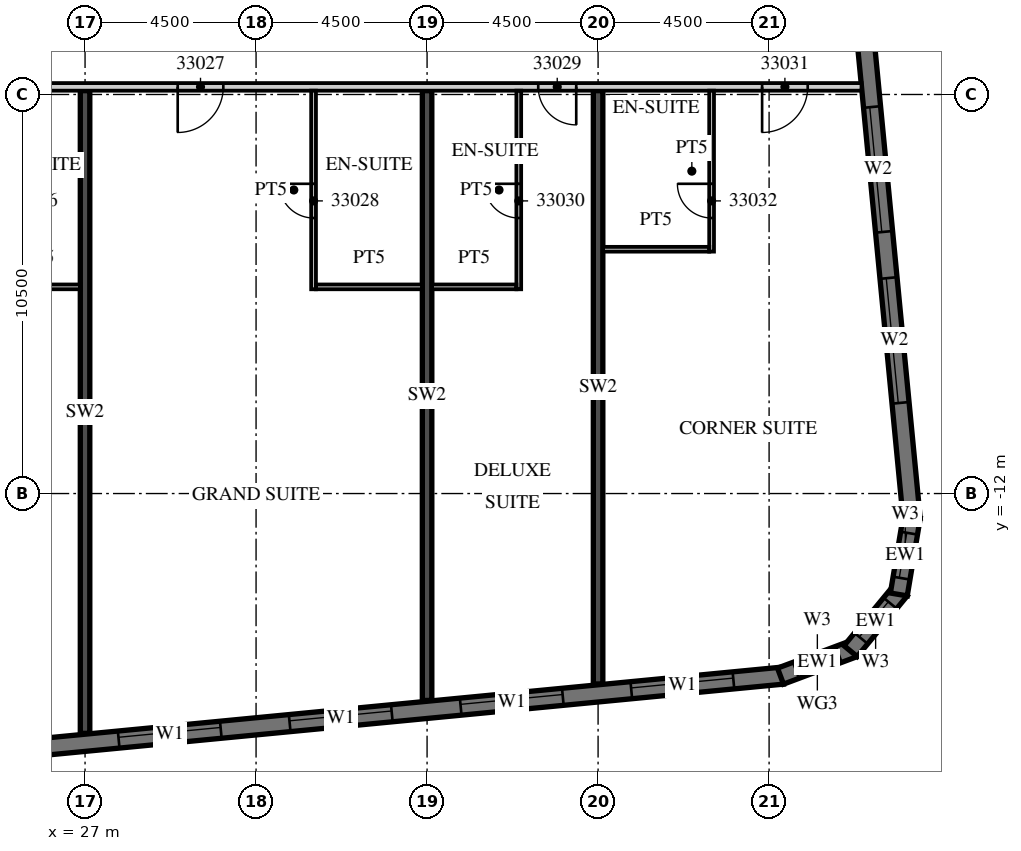
"""IFC4 building model, lengths in metres.
Left out: names, types, materials, properties, quantities, classifications, styles, units other than length and angle.
Written with IfcOpenShell. Run it as: python <this file> out.ifc"""

import sys

from ifc_helpers import new_model, si_unit, direction, frame, frame_2d, origin, place, context, subcontext, project, spatial, polyline, rectangle, outline, extrude, element, fill, save


model = new_model("IFC4")
c1 = context("Model", 3, precision=1e-05, world=origin(), true_north=direction((0.0, 1.0)))
c2 = subcontext(c1, "Body", "Model", "MODEL_VIEW")
j1 = project(units=[si_unit("LENGTHUNIT", "METRE"), si_unit("PLANEANGLEUNIT", "RADIAN")], contexts=[c1])
p1 = place(None, origin())
s1 = spatial("IfcSite", under=j1, at=p1, CompositionType="ELEMENT")
p2 = place(p1, origin())
s2 = spatial("IfcBuilding", under=s1, at=p2, CompositionType="ELEMENT")
p3 = place(p2, frame((0.0, 0.0, 143.8)))
s3 = spatial("IfcBuildingStorey", under=s2, at=p3, CompositionType="ELEMENT", Elevation=143.8)
p4 = place(p3, frame((27.0, -18.311, 0.0), z_axis=(0.0, 0.0, 1.0), x_axis=(0.0, 1.0, 0.0)))
e1 = element("IfcWall", 1, at=p4, inside=s3, PredefinedType="SHEAR", context=c2, shape_type="SweptSolid", body=[
    extrude(rectangle(XDim=16.911, YDim=0.25, at=frame_2d((8.455, 0.0))), origin(), (0.0, 0.0, 1.0), 3.3),
])
p5 = place(p3, frame((36.0, -17.444, 0.0), z_axis=(0.0, 0.0, 1.0), x_axis=(0.0, 1.0, 0.0)))
e2 = element("IfcWall", 2, at=p5, inside=s3, PredefinedType="SHEAR", context=c2, shape_type="SweptSolid", body=[
    extrude(rectangle(XDim=16.044, YDim=0.25, at=frame_2d((8.022, 0.0))), origin(), (0.0, 0.0, 1.0), 3.3),
])
p6 = place(p3, frame((40.5, -17.011, 0.0), z_axis=(0.0, 0.0, 1.0), x_axis=(0.0, 1.0, 0.0)))
e3 = element("IfcWall", 3, at=p6, inside=s3, PredefinedType="SHEAR", context=c2, shape_type="SweptSolid", body=[
    extrude(rectangle(XDim=15.611, YDim=0.25, at=frame_2d((7.805, 0.0))), origin(), (0.0, 0.0, 1.0), 3.3),
])
p7 = place(p3, frame((-13.521, -22.46, 0.0), z_axis=(0.0, 0.0, 1.0), x_axis=(0.995396096335, 0.095846812164, 0.0)))
e4 = element("IfcWall", 4, at=p7, inside=s3, PredefinedType="SOLIDWALL", context=c2, shape_type="SweptSolid", body=[
    extrude(rectangle(XDim=59.151, YDim=0.45, at=frame_2d((29.575, 0.0))), origin(), (0.0, 0.0, 1.0), 3.02),
])
p8 = place(p7, frame((0.91, 0.0, 0.45)))
e5 = element("IfcOpeningElement", 5, at=p8, cuts=e4, PredefinedType="OPENING", context=c2, shape_type="SweptSolid", body=[
    extrude(rectangle(XDim=2.7, YDim=2.25, at=frame_2d((1.35, 1.125))), frame((0.0, 0.235, 0.0), z_axis=(0.0, -1.0, 0.0), x_axis=(1.0, 0.0, 0.0)), (0.0, 0.0, 1.0), 0.47),
])
p9 = place(p7, frame((5.431, 0.0, 0.45)))
e6 = element("IfcOpeningElement", 6, at=p9, cuts=e4, PredefinedType="OPENING", context=c2, shape_type="SweptSolid", body=[
    extrude(rectangle(XDim=2.7, YDim=2.25, at=frame_2d((1.35, 1.125))), frame((0.0, 0.235, 0.0), z_axis=(0.0, -1.0, 0.0), x_axis=(1.0, 0.0, 0.0)), (0.0, 0.0, 1.0), 0.47),
])
p10 = place(p7, frame((9.952, 0.0, 0.45)))
e7 = element("IfcOpeningElement", 7, at=p10, cuts=e4, PredefinedType="OPENING", context=c2, shape_type="SweptSolid", body=[
    extrude(rectangle(XDim=2.7, YDim=2.25, at=frame_2d((1.35, 1.125))), frame((0.0, 0.235, 0.0), z_axis=(0.0, -1.0, 0.0), x_axis=(1.0, 0.0, 0.0)), (0.0, 0.0, 1.0), 0.47),
])
p11 = place(p7, frame((14.473, 0.0, 0.45)))
e8 = element("IfcOpeningElement", 8, at=p11, cuts=e4, PredefinedType="OPENING", context=c2, shape_type="SweptSolid", body=[
    extrude(rectangle(XDim=2.7, YDim=2.25, at=frame_2d((1.35, 1.125))), frame((0.0, 0.235, 0.0), z_axis=(0.0, -1.0, 0.0), x_axis=(1.0, 0.0, 0.0)), (0.0, 0.0, 1.0), 0.47),
])
p12 = place(p7, frame((18.994, 0.0, 0.45)))
e9 = element("IfcOpeningElement", 9, at=p12, cuts=e4, PredefinedType="OPENING", context=c2, shape_type="SweptSolid", body=[
    extrude(rectangle(XDim=2.7, YDim=2.25, at=frame_2d((1.35, 1.125))), frame((0.0, 0.235, 0.0), z_axis=(0.0, -1.0, 0.0), x_axis=(1.0, 0.0, 0.0)), (0.0, 0.0, 1.0), 0.47),
])
p13 = place(p7, frame((23.514, 0.0, 0.45)))
e10 = element("IfcOpeningElement", 10, at=p13, cuts=e4, PredefinedType="OPENING", context=c2, shape_type="SweptSolid", body=[
    extrude(rectangle(XDim=2.7, YDim=2.25, at=frame_2d((1.35, 1.125))), frame((0.0, 0.235, 0.0), z_axis=(0.0, -1.0, 0.0), x_axis=(1.0, 0.0, 0.0)), (0.0, 0.0, 1.0), 0.47),
])
p14 = place(p7, frame((28.035, 0.0, 0.45)))
e11 = element("IfcOpeningElement", 11, at=p14, cuts=e4, PredefinedType="OPENING", context=c2, shape_type="SweptSolid", body=[
    extrude(rectangle(XDim=2.7, YDim=2.25, at=frame_2d((1.35, 1.125))), frame((0.0, 0.235, 0.0), z_axis=(0.0, -1.0, 0.0), x_axis=(1.0, 0.0, 0.0)), (0.0, 0.0, 1.0), 0.47),
])
p15 = place(p7, frame((32.556, 0.0, 0.45)))
e12 = element("IfcOpeningElement", 12, at=p15, cuts=e4, PredefinedType="OPENING", context=c2, shape_type="SweptSolid", body=[
    extrude(rectangle(XDim=2.7, YDim=2.25, at=frame_2d((1.35, 1.125))), frame((0.0, 0.235, 0.0), z_axis=(0.0, -1.0, 0.0), x_axis=(1.0, 0.0, 0.0)), (0.0, 0.0, 1.0), 0.47),
])
p16 = place(p7, frame((37.077, 0.0, 0.45)))
e13 = element("IfcOpeningElement", 13, at=p16, cuts=e4, PredefinedType="OPENING", context=c2, shape_type="SweptSolid", body=[
    extrude(rectangle(XDim=2.7, YDim=2.25, at=frame_2d((1.35, 1.125))), frame((0.0, 0.235, 0.0), z_axis=(0.0, -1.0, 0.0), x_axis=(1.0, 0.0, 0.0)), (0.0, 0.0, 1.0), 0.47),
])
p17 = place(p7, frame((41.598, 0.0, 0.45)))
e14 = element("IfcOpeningElement", 14, at=p17, cuts=e4, PredefinedType="OPENING", context=c2, shape_type="SweptSolid", body=[
    extrude(rectangle(XDim=2.7, YDim=2.25, at=frame_2d((1.35, 1.125))), frame((0.0, 0.235, 0.0), z_axis=(0.0, -1.0, 0.0), x_axis=(1.0, 0.0, 0.0)), (0.0, 0.0, 1.0), 0.47),
])
p18 = place(p7, frame((46.118, 0.0, 0.45)))
e15 = element("IfcOpeningElement", 15, at=p18, cuts=e4, PredefinedType="OPENING", context=c2, shape_type="SweptSolid", body=[
    extrude(rectangle(XDim=2.7, YDim=2.25, at=frame_2d((1.35, 1.125))), frame((0.0, 0.235, 0.0), z_axis=(0.0, -1.0, 0.0), x_axis=(1.0, 0.0, 0.0)), (0.0, 0.0, 1.0), 0.47),
])
p19 = place(p7, frame((50.639, 0.0, 0.45)))
e16 = element("IfcOpeningElement", 16, at=p19, cuts=e4, PredefinedType="OPENING", context=c2, shape_type="SweptSolid", body=[
    extrude(rectangle(XDim=2.7, YDim=2.25, at=frame_2d((1.35, 1.125))), frame((0.0, 0.235, 0.0), z_axis=(0.0, -1.0, 0.0), x_axis=(1.0, 0.0, 0.0)), (0.0, 0.0, 1.0), 0.47),
])
p20 = place(p7, frame((55.15, 0.0, 0.45)))
e17 = element("IfcOpeningElement", 17, at=p20, cuts=e4, PredefinedType="OPENING", context=c2, shape_type="SweptSolid", body=[
    extrude(rectangle(XDim=2.7, YDim=2.25, at=frame_2d((1.35, 1.125))), frame((0.0, 0.235, 0.0), z_axis=(0.0, -1.0, 0.0), x_axis=(1.0, 0.0, 0.0)), (0.0, 0.0, 1.0), 0.47),
])
p21 = place(p3, frame((45.3, -16.804, 0.0), z_axis=(0.0, 0.0, 1.0), x_axis=(0.936677599948, 0.350192909346, 0.0)))
e18 = element("IfcWall", 18, at=p21, inside=s3, PredefinedType="SOLIDWALL", context=c2, shape_type="SweptSolid", body=[
    extrude(outline(polyline([(0.0, -0.225), (2.071, -0.225), (1.95, 0.225), (0.121, 0.225), (0.0, -0.225)])), origin(), (0.0, 0.0, 1.0), 3.02),
])
p22 = place(p21, frame((0.435, 0.0, 0.45)))
e19 = element("IfcOpeningElement", 19, at=p22, cuts=e18, PredefinedType="OPENING", context=c2, shape_type="SweptSolid", body=[
    extrude(rectangle(XDim=1.2, YDim=2.25, at=frame_2d((0.6, 1.125))), frame((0.0, 0.235, 0.0), z_axis=(0.0, -1.0, 0.0), x_axis=(1.0, 0.0, 0.0)), (0.0, 0.0, 1.0), 0.47),
])
p23 = place(p3, frame((47.145, -16.147, 0.0), z_axis=(0.0, 0.0, 1.0), x_axis=(0.635988241739, 0.771698747161, 0.0)))
e20 = element("IfcWall", 20, at=p23, inside=s3, PredefinedType="SOLIDWALL", context=c2, shape_type="SweptSolid", body=[
    extrude(outline(polyline([(0.0, -0.225), (2.071, -0.225), (1.95, 0.225), (0.121, 0.225), (0.0, -0.225)])), origin(), (0.0, 0.0, 1.0), 3.02),
])
p24 = place(p23, frame((0.435, 0.0, 0.45)))
e21 = element("IfcOpeningElement", 21, at=p24, cuts=e20, PredefinedType="OPENING", context=c2, shape_type="SweptSolid", body=[
    extrude(rectangle(XDim=1.2, YDim=2.25, at=frame_2d((0.6, 1.125))), frame((0.0, 0.235, 0.0), z_axis=(0.0, -1.0, 0.0), x_axis=(1.0, 0.0, 0.0)), (0.0, 0.0, 1.0), 0.47),
])
p25 = place(p3, frame((48.413, -14.655, 0.0), z_axis=(0.0, 0.0, 1.0), x_axis=(0.165068144653, 0.986282164302, 0.0)))
e22 = element("IfcWall", 22, at=p25, inside=s3, PredefinedType="SOLIDWALL", context=c2, shape_type="SweptSolid", body=[
    extrude(outline(polyline([(0.0, -0.225), (2.071, -0.225), (1.95, 0.225), (0.121, 0.225), (0.0, -0.225)])), origin(), (0.0, 0.0, 1.0), 3.02),
])
p26 = place(p25, frame((0.435, 0.0, 0.45)))
e23 = element("IfcOpeningElement", 23, at=p26, cuts=e22, PredefinedType="OPENING", context=c2, shape_type="SweptSolid", body=[
    extrude(rectangle(XDim=1.2, YDim=2.25, at=frame_2d((0.6, 1.125))), frame((0.0, 0.235, 0.0), z_axis=(0.0, -1.0, 0.0), x_axis=(1.0, 0.0, 0.0)), (0.0, 0.0, 1.0), 0.47),
])
p27 = place(p3, frame((48.753, -12.672, 0.0), z_axis=(0.0, 0.0, 1.0), x_axis=(-0.095842661909, 0.995396495954, 0.0)))
e24 = element("IfcWall", 24, at=p27, inside=s3, PredefinedType="SOLIDWALL", context=c2, shape_type="SweptSolid", body=[
    extrude(rectangle(XDim=35.0, YDim=0.45, at=frame_2d((17.5, 0.0))), origin(), (0.0, 0.0, 1.0), 3.02),
])
p28 = place(p27, frame((3.072, 0.0, 0.45)))
e25 = element("IfcOpeningElement", 25, at=p28, cuts=e24, PredefinedType="OPENING", context=c2, shape_type="SweptSolid", body=[
    extrude(rectangle(XDim=3.3, YDim=2.25, at=frame_2d((1.65, 1.125))), frame((0.0, 0.235, 0.0), z_axis=(0.0, -1.0, 0.0), x_axis=(1.0, 0.0, 0.0)), (0.0, 0.0, 1.0), 0.47),
])
p29 = place(p27, frame((7.593, 0.0, 0.45)))
e26 = element("IfcOpeningElement", 26, at=p29, cuts=e24, PredefinedType="OPENING", context=c2, shape_type="SweptSolid", body=[
    extrude(rectangle(XDim=3.3, YDim=2.25, at=frame_2d((1.65, 1.125))), frame((0.0, 0.235, 0.0), z_axis=(0.0, -1.0, 0.0), x_axis=(1.0, 0.0, 0.0)), (0.0, 0.0, 1.0), 0.47),
])
p30 = place(p3, frame((-13.5, -1.3, 0.0), z_axis=(0.0, 0.0, 1.0), x_axis=(1.0, 0.0, 0.0)))
e27 = element("IfcWall", 27, at=p30, inside=s3, PredefinedType="PARTITIONING", context=c2, shape_type="SweptSolid", body=[
    extrude(rectangle(XDim=60.932, YDim=0.2, at=frame_2d((30.466, 0.0))), origin(), (0.0, 0.0, 1.0), 3.02),
])
p31 = place(p30, frame((2.925, 0.0, 0.0)))
e28 = element("IfcOpeningElement", 28, at=p31, cuts=e27, PredefinedType="OPENING", context=c2, shape_type="SweptSolid", body=[
    extrude(rectangle(XDim=1.0, YDim=2.1, at=frame_2d((0.5, 1.05))), frame((0.0, 0.11, 0.0), z_axis=(0.0, -1.0, 0.0), x_axis=(1.0, 0.0, 0.0)), (0.0, 0.0, 1.0), 0.22),
])
p32 = place(p30, frame((6.938, 0.0, 0.0)))
e29 = element("IfcOpeningElement", 29, at=p32, cuts=e27, PredefinedType="OPENING", context=c2, shape_type="SweptSolid", body=[
    extrude(rectangle(XDim=1.2, YDim=2.1, at=frame_2d((0.6, 1.05))), frame((0.0, 0.11, 0.0), z_axis=(0.0, -1.0, 0.0), x_axis=(1.0, 0.0, 0.0)), (0.0, 0.0, 1.0), 0.22),
])
p33 = place(p30, frame((15.938, 0.0, 0.0)))
e30 = element("IfcOpeningElement", 30, at=p33, cuts=e27, PredefinedType="OPENING", context=c2, shape_type="SweptSolid", body=[
    extrude(rectangle(XDim=1.2, YDim=2.1, at=frame_2d((0.6, 1.05))), frame((0.0, 0.11, 0.0), z_axis=(0.0, -1.0, 0.0), x_axis=(1.0, 0.0, 0.0)), (0.0, 0.0, 1.0), 0.22),
])
p34 = place(p30, frame((24.938, 0.0, 0.0)))
e31 = element("IfcOpeningElement", 31, at=p34, cuts=e27, PredefinedType="OPENING", context=c2, shape_type="SweptSolid", body=[
    extrude(rectangle(XDim=1.2, YDim=2.1, at=frame_2d((0.6, 1.05))), frame((0.0, 0.11, 0.0), z_axis=(0.0, -1.0, 0.0), x_axis=(1.0, 0.0, 0.0)), (0.0, 0.0, 1.0), 0.22),
])
p35 = place(p30, frame((32.075, 0.0, 0.0)))
e32 = element("IfcOpeningElement", 32, at=p35, cuts=e27, PredefinedType="OPENING", context=c2, shape_type="SweptSolid", body=[
    extrude(rectangle(XDim=1.0, YDim=2.1, at=frame_2d((0.5, 1.05))), frame((0.0, 0.11, 0.0), z_axis=(0.0, -1.0, 0.0), x_axis=(1.0, 0.0, 0.0)), (0.0, 0.0, 1.0), 0.22),
])
p36 = place(p30, frame((36.55, 0.0, 0.0)))
e33 = element("IfcOpeningElement", 33, at=p36, cuts=e27, PredefinedType="OPENING", context=c2, shape_type="SweptSolid", body=[
    extrude(rectangle(XDim=1.0, YDim=2.1, at=frame_2d((0.5, 1.05))), frame((0.0, 0.11, 0.0), z_axis=(0.0, -1.0, 0.0), x_axis=(1.0, 0.0, 0.0)), (0.0, 0.0, 1.0), 0.22),
])
p37 = place(p30, frame((42.938, 0.0, 0.0)))
e34 = element("IfcOpeningElement", 34, at=p37, cuts=e27, PredefinedType="OPENING", context=c2, shape_type="SweptSolid", body=[
    extrude(rectangle(XDim=1.2, YDim=2.1, at=frame_2d((0.6, 1.05))), frame((0.0, 0.11, 0.0), z_axis=(0.0, -1.0, 0.0), x_axis=(1.0, 0.0, 0.0)), (0.0, 0.0, 1.0), 0.22),
])
p38 = place(p30, frame((52.425, 0.0, 0.0)))
e35 = element("IfcOpeningElement", 35, at=p38, cuts=e27, PredefinedType="OPENING", context=c2, shape_type="SweptSolid", body=[
    extrude(rectangle(XDim=1.0, YDim=2.1, at=frame_2d((0.5, 1.05))), frame((0.0, 0.11, 0.0), z_axis=(0.0, -1.0, 0.0), x_axis=(1.0, 0.0, 0.0)), (0.0, 0.0, 1.0), 0.22),
])
p39 = place(p30, frame((58.316, 0.0, 0.0)))
e36 = element("IfcOpeningElement", 36, at=p39, cuts=e27, PredefinedType="OPENING", context=c2, shape_type="SweptSolid", body=[
    extrude(rectangle(XDim=1.2, YDim=2.1, at=frame_2d((0.6, 1.05))), frame((0.0, 0.11, 0.0), z_axis=(0.0, -1.0, 0.0), x_axis=(1.0, 0.0, 0.0)), (0.0, 0.0, 1.0), 0.22),
])
p40 = place(p3, frame((24.625, -6.562, 0.0), z_axis=(0.0, 0.0, 1.0), x_axis=(1.0, 0.0, 0.0)))
e37 = element("IfcWall", 37, at=p40, inside=s3, PredefinedType="PARTITIONING", context=c2, shape_type="SweptSolid", body=[
    extrude(rectangle(XDim=2.25, YDim=0.125, at=frame_2d((1.125, 0.0))), origin(), (0.0, 0.0, 1.0), 3.02),
])
p41 = place(p3, frame((33.013, -6.625, 0.0), z_axis=(0.0, 0.0, 1.0), x_axis=(0.0, 1.0, 0.0)))
e38 = element("IfcWall", 38, at=p41, inside=s3, PredefinedType="PARTITIONING", context=c2, shape_type="SweptSolid", body=[
    extrude(rectangle(XDim=5.225, YDim=0.125, at=frame_2d((2.613, 0.0))), origin(), (0.0, 0.0, 1.0), 3.02),
])
p42 = place(p41, frame((1.875, 0.0, 0.0)))
e39 = element("IfcOpeningElement", 39, at=p42, cuts=e38, PredefinedType="OPENING", context=c2, shape_type="SweptSolid", body=[
    extrude(rectangle(XDim=0.9, YDim=2.1, at=frame_2d((0.45, 1.05))), frame((0.0, 0.073, 0.0), z_axis=(0.0, -1.0, 0.0), x_axis=(1.0, 0.0, 0.0)), (0.0, 0.0, 1.0), 0.145),
])
p43 = place(p3, frame((33.075, -6.562, 0.0), z_axis=(0.0, 0.0, 1.0), x_axis=(1.0, 0.0, 0.0)))
e40 = element("IfcWall", 40, at=p43, inside=s3, PredefinedType="PARTITIONING", context=c2, shape_type="SweptSolid", body=[
    extrude(rectangle(XDim=2.8, YDim=0.125, at=frame_2d((1.4, 0.0))), origin(), (0.0, 0.0, 1.0), 3.02),
])
p44 = place(p3, frame((38.413, -6.625, 0.0), z_axis=(0.0, 0.0, 1.0), x_axis=(0.0, 1.0, 0.0)))
e41 = element("IfcWall", 41, at=p44, inside=s3, PredefinedType="PARTITIONING", context=c2, shape_type="SweptSolid", body=[
    extrude(rectangle(XDim=5.225, YDim=0.125, at=frame_2d((2.613, 0.0))), origin(), (0.0, 0.0, 1.0), 3.02),
])
p45 = place(p44, frame((1.875, 0.0, 0.0)))
e42 = element("IfcOpeningElement", 42, at=p45, cuts=e41, PredefinedType="OPENING", context=c2, shape_type="SweptSolid", body=[
    extrude(rectangle(XDim=0.9, YDim=2.1, at=frame_2d((0.45, 1.05))), frame((0.0, 0.073, 0.0), z_axis=(0.0, -1.0, 0.0), x_axis=(1.0, 0.0, 0.0)), (0.0, 0.0, 1.0), 0.145),
])
p46 = place(p3, frame((36.125, -6.562, 0.0), z_axis=(0.0, 0.0, 1.0), x_axis=(1.0, 0.0, 0.0)))
e43 = element("IfcWall", 43, at=p46, inside=s3, PredefinedType="PARTITIONING", context=c2, shape_type="SweptSolid", body=[
    extrude(rectangle(XDim=2.225, YDim=0.125, at=frame_2d((1.113, 0.0))), origin(), (0.0, 0.0, 1.0), 3.02),
])
p47 = place(p3, frame((43.487, -5.634, 0.0), z_axis=(0.0, 0.0, 1.0), x_axis=(0.0, 1.0, 0.0)))
e44 = element("IfcWall", 44, at=p47, inside=s3, PredefinedType="PARTITIONING", context=c2, shape_type="SweptSolid", body=[
    extrude(rectangle(XDim=4.234, YDim=0.125, at=frame_2d((2.117, 0.0))), origin(), (0.0, 0.0, 1.0), 3.02),
])
p48 = place(p47, frame((0.884, 0.0, 0.0)))
e45 = element("IfcOpeningElement", 45, at=p48, cuts=e44, PredefinedType="OPENING", context=c2, shape_type="SweptSolid", body=[
    extrude(rectangle(XDim=0.9, YDim=2.1, at=frame_2d((0.45, 1.05))), frame((0.0, 0.073, 0.0), z_axis=(0.0, -1.0, 0.0), x_axis=(1.0, 0.0, 0.0)), (0.0, 0.0, 1.0), 0.145),
])
p49 = place(p3, frame((40.625, -5.572, 0.0), z_axis=(0.0, 0.0, 1.0), x_axis=(1.0, 0.0, 0.0)))
e46 = element("IfcWall", 46, at=p49, inside=s3, PredefinedType="PARTITIONING", context=c2, shape_type="SweptSolid", body=[
    extrude(rectangle(XDim=2.8, YDim=0.125, at=frame_2d((1.4, 0.0))), origin(), (0.0, 0.0, 1.0), 3.02),
])
p50 = place(p17, origin())
e47 = element("IfcWindow", 47, at=p50, inside=s3, PartitioningType="SINGLE_PANEL", PredefinedType="WINDOW", context=c2, shape_type="SweptSolid", body=[
    extrude(rectangle(XDim=2.7, YDim=2.25, at=frame_2d((1.35, 1.125))), frame((0.0, 0.09, 0.0), z_axis=(0.0, -1.0, 0.0), x_axis=(1.0, 0.0, 0.0)), (0.0, 0.0, 1.0), 0.06),
])
fill(e14, e47)
p51 = place(p18, origin())
e48 = element("IfcWindow", 48, at=p51, inside=s3, PartitioningType="SINGLE_PANEL", PredefinedType="WINDOW", context=c2, shape_type="SweptSolid", body=[
    extrude(rectangle(XDim=2.7, YDim=2.25, at=frame_2d((1.35, 1.125))), frame((0.0, 0.09, 0.0), z_axis=(0.0, -1.0, 0.0), x_axis=(1.0, 0.0, 0.0)), (0.0, 0.0, 1.0), 0.06),
])
fill(e15, e48)
p52 = place(p19, origin())
e49 = element("IfcWindow", 49, at=p52, inside=s3, PartitioningType="SINGLE_PANEL", PredefinedType="WINDOW", context=c2, shape_type="SweptSolid", body=[
    extrude(rectangle(XDim=2.7, YDim=2.25, at=frame_2d((1.35, 1.125))), frame((0.0, 0.09, 0.0), z_axis=(0.0, -1.0, 0.0), x_axis=(1.0, 0.0, 0.0)), (0.0, 0.0, 1.0), 0.06),
])
fill(e16, e49)
p53 = place(p20, origin())
e50 = element("IfcWindow", 50, at=p53, inside=s3, PartitioningType="SINGLE_PANEL", PredefinedType="WINDOW", context=c2, shape_type="SweptSolid", body=[
    extrude(rectangle(XDim=2.7, YDim=2.25, at=frame_2d((1.35, 1.125))), frame((0.0, 0.09, 0.0), z_axis=(0.0, -1.0, 0.0), x_axis=(1.0, 0.0, 0.0)), (0.0, 0.0, 1.0), 0.06),
])
fill(e17, e50)
p54 = place(p22, origin())
e51 = element("IfcWindow", 51, at=p54, inside=s3, PartitioningType="SINGLE_PANEL", PredefinedType="WINDOW", context=c2, shape_type="SweptSolid", body=[
    extrude(rectangle(XDim=1.2, YDim=2.25, at=frame_2d((0.6, 1.125))), frame((0.0, 0.09, 0.0), z_axis=(0.0, -1.0, 0.0), x_axis=(1.0, 0.0, 0.0)), (0.0, 0.0, 1.0), 0.06),
])
fill(e19, e51)
p55 = place(p24, origin())
e52 = element("IfcWindow", 52, at=p55, inside=s3, PartitioningType="SINGLE_PANEL", PredefinedType="WINDOW", context=c2, shape_type="SweptSolid", body=[
    extrude(rectangle(XDim=1.2, YDim=2.25, at=frame_2d((0.6, 1.125))), frame((0.0, 0.09, 0.0), z_axis=(0.0, -1.0, 0.0), x_axis=(1.0, 0.0, 0.0)), (0.0, 0.0, 1.0), 0.06),
])
fill(e21, e52)
p56 = place(p26, origin())
e53 = element("IfcWindow", 53, at=p56, inside=s3, PartitioningType="SINGLE_PANEL", PredefinedType="WINDOW", context=c2, shape_type="SweptSolid", body=[
    extrude(rectangle(XDim=1.2, YDim=2.25, at=frame_2d((0.6, 1.125))), frame((0.0, 0.09, 0.0), z_axis=(0.0, -1.0, 0.0), x_axis=(1.0, 0.0, 0.0)), (0.0, 0.0, 1.0), 0.06),
])
fill(e23, e53)
p57 = place(p28, origin())
e54 = element("IfcWindow", 54, at=p57, inside=s3, PartitioningType="SINGLE_PANEL", PredefinedType="WINDOW", context=c2, shape_type="SweptSolid", body=[
    extrude(rectangle(XDim=3.3, YDim=2.25, at=frame_2d((1.65, 1.125))), frame((0.0, 0.09, 0.0), z_axis=(0.0, -1.0, 0.0), x_axis=(1.0, 0.0, 0.0)), (0.0, 0.0, 1.0), 0.06),
])
fill(e25, e54)
p58 = place(p29, origin())
e55 = element("IfcWindow", 55, at=p58, inside=s3, PartitioningType="SINGLE_PANEL", PredefinedType="WINDOW", context=c2, shape_type="SweptSolid", body=[
    extrude(rectangle(XDim=3.3, YDim=2.25, at=frame_2d((1.65, 1.125))), frame((0.0, 0.09, 0.0), z_axis=(0.0, -1.0, 0.0), x_axis=(1.0, 0.0, 0.0)), (0.0, 0.0, 1.0), 0.06),
])
fill(e26, e55)
p59 = place(p37, origin())
e56 = element("IfcDoor", 56, at=p59, inside=s3, OperationType="SINGLE_SWING_LEFT", PredefinedType="DOOR", context=c2, shape_type="SweptSolid", body=[
    extrude(rectangle(XDim=1.2, YDim=2.1, at=frame_2d((0.6, 1.05))), frame((0.0, 0.025, 0.0), z_axis=(0.0, -1.0, 0.0), x_axis=(1.0, 0.0, 0.0)), (0.0, 0.0, 1.0), 0.05),
])
fill(e34, e56)
p60 = place(p42, origin())
e57 = element("IfcDoor", 57, at=p60, inside=s3, OperationType="SINGLE_SWING_RIGHT", PredefinedType="DOOR", context=c2, shape_type="SweptSolid", body=[
    extrude(rectangle(XDim=0.9, YDim=2.1, at=frame_2d((0.45, 1.05))), frame((0.0, 0.025, 0.0), z_axis=(0.0, -1.0, 0.0), x_axis=(1.0, 0.0, 0.0)), (0.0, 0.0, 1.0), 0.05),
])
fill(e39, e57)
p61 = place(p38, origin())
e58 = element("IfcDoor", 58, at=p61, inside=s3, OperationType="SINGLE_SWING_RIGHT", PredefinedType="DOOR", context=c2, shape_type="SweptSolid", body=[
    extrude(rectangle(XDim=1.0, YDim=2.1, at=frame_2d((0.5, 1.05))), frame((0.0, 0.025, 0.0), z_axis=(0.0, -1.0, 0.0), x_axis=(1.0, 0.0, 0.0)), (0.0, 0.0, 1.0), 0.05),
])
fill(e35, e58)
p62 = place(p45, origin())
e59 = element("IfcDoor", 59, at=p62, inside=s3, OperationType="SINGLE_SWING_RIGHT", PredefinedType="DOOR", context=c2, shape_type="SweptSolid", body=[
    extrude(rectangle(XDim=0.9, YDim=2.1, at=frame_2d((0.45, 1.05))), frame((0.0, 0.025, 0.0), z_axis=(0.0, -1.0, 0.0), x_axis=(1.0, 0.0, 0.0)), (0.0, 0.0, 1.0), 0.05),
])
fill(e42, e59)
p63 = place(p39, origin())
e60 = element("IfcDoor", 60, at=p63, inside=s3, OperationType="SINGLE_SWING_LEFT", PredefinedType="DOOR", context=c2, shape_type="SweptSolid", body=[
    extrude(rectangle(XDim=1.2, YDim=2.1, at=frame_2d((0.6, 1.05))), frame((0.0, 0.025, 0.0), z_axis=(0.0, -1.0, 0.0), x_axis=(1.0, 0.0, 0.0)), (0.0, 0.0, 1.0), 0.05),
])
fill(e36, e60)
p64 = place(p48, origin())
e61 = element("IfcDoor", 61, at=p64, inside=s3, OperationType="SINGLE_SWING_RIGHT", PredefinedType="DOOR", context=c2, shape_type="SweptSolid", body=[
    extrude(rectangle(XDim=0.9, YDim=2.1, at=frame_2d((0.45, 1.05))), frame((0.0, 0.025, 0.0), z_axis=(0.0, -1.0, 0.0), x_axis=(1.0, 0.0, 0.0)), (0.0, 0.0, 1.0), 0.05),
])
fill(e45, e61)
save(model, sys.argv[1])
